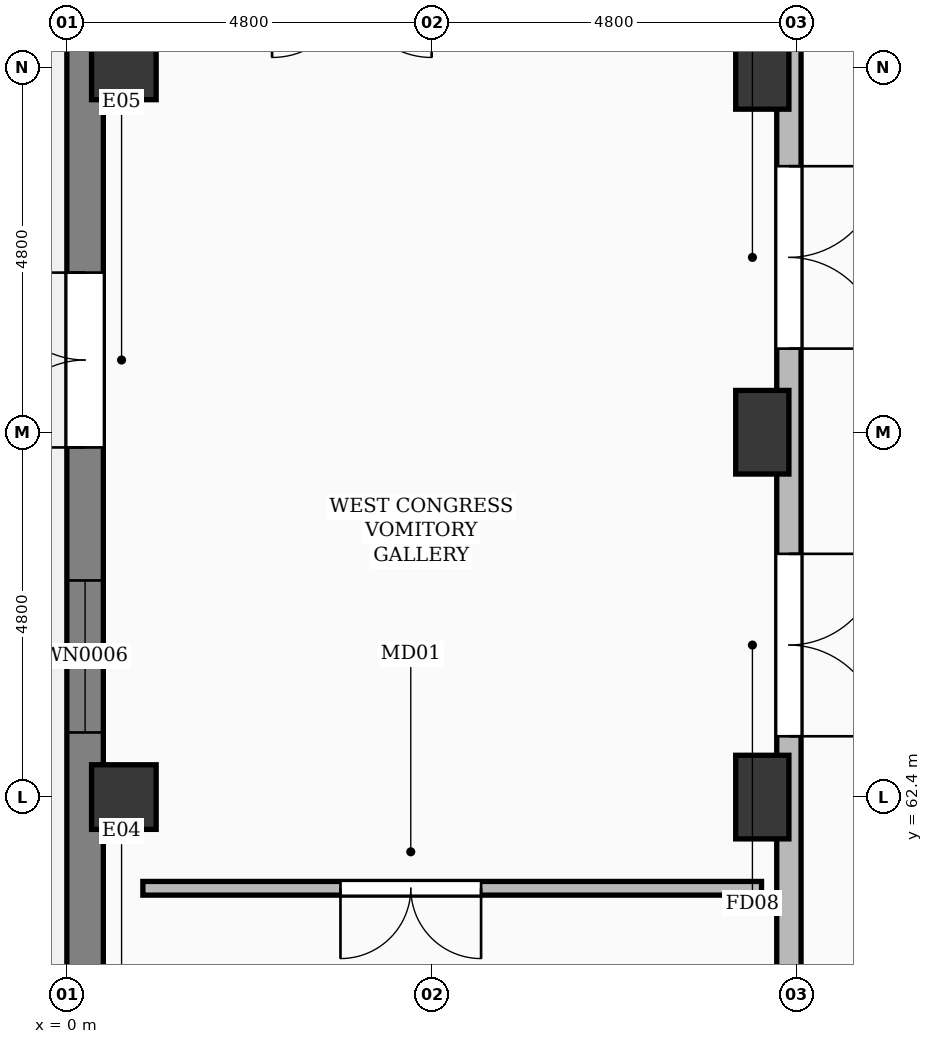
"""IFC4 building model, lengths in metres.
Left out: names, types, materials, properties, quantities, classifications, styles, units other than length and angle.
Written with IfcOpenShell. Run it as: python <this file> out.ifc"""

import sys

from ifc_helpers import new_model, si_unit, direction, frame, frame_2d, origin, origin_2d, place, context, subcontext, project, spatial, rectangle, extrude, element, fill, save


model = new_model("IFC4")
c1 = context("Model", 3, precision=1e-05, world=origin(), true_north=direction((0.0, 1.0)))
c2 = subcontext(c1, "Body", "Model", "MODEL_VIEW")
j1 = project(units=[si_unit("LENGTHUNIT", "METRE"), si_unit("PLANEANGLEUNIT", "RADIAN")], contexts=[c1])
p1 = place(None, origin())
s1 = spatial("IfcSite", under=j1, at=p1, CompositionType="ELEMENT")
p2 = place(p1, origin())
s2 = spatial("IfcBuilding", under=s1, at=p2, CompositionType="ELEMENT")
p3 = place(p2, origin())
s3 = spatial("IfcBuildingStorey", under=s2, at=p3, CompositionType="ELEMENT", Elevation=0.0)
for number, where, z_axis, x_axis in (
    (1, (0.75, 62.4, 0.0), (0.0, 0.0, 1.0), (1.0, 0.0, 0.0)),
    (2, (0.75, 72.0, 0.0), (0.0, 0.0, 1.0), (1.0, 0.0, 0.0)),
):
    element("IfcColumn", number, at=place(p3, frame(where, z_axis=z_axis, x_axis=x_axis)), inside=s3, PredefinedType="COLUMN", context=c2, shape_type="SweptSolid", body=[
        extrude(rectangle(XDim=0.85, YDim=0.85, at=origin_2d()), origin(), (0.0, 0.0, 1.0), 6.0),
    ])
for number, where, z_axis, x_axis in (
    (3, (9.15, 62.4, 0.0), (0.0, 0.0, 1.0), (1.0, 0.0, 0.0)),
    (4, (9.15, 67.2, 0.0), (0.0, 0.0, 1.0), (1.0, 0.0, 0.0)),
    (5, (9.15, 72.0, 0.0), (0.0, 0.0, 1.0), (1.0, 0.0, 0.0)),
):
    element("IfcColumn", number, at=place(p3, frame(where, z_axis=z_axis, x_axis=x_axis)), inside=s3, PredefinedType="COLUMN", context=c2, shape_type="SweptSolid", body=[
        extrude(rectangle(XDim=0.7, YDim=1.1, at=origin_2d()), origin(), (0.0, 0.0, 1.0), 6.0),
    ])
p4 = place(p3, frame((0.24, 33.6, 0.0), z_axis=(0.0, 0.0, 1.0), x_axis=(0.0, 1.0, 0.0)))
e6 = element("IfcWall", 6, at=p4, inside=s3, PredefinedType="SOLIDWALL", context=c2, shape_type="SweptSolid", body=[
    extrude(rectangle(XDim=92.4, YDim=0.48, at=frame_2d((46.2, 0.0))), origin(), (0.0, 0.0, 1.0), 6.0),
])
p5 = place(p4, frame((4.2, 0.0, 0.0)))
e7 = element("IfcOpeningElement", 7, at=p5, cuts=e6, PredefinedType="OPENING", context=c2, shape_type="SweptSolid", body=[
    extrude(rectangle(XDim=2.3, YDim=2.4, at=frame_2d((1.15, 1.2))), frame((0.0, 0.252, 0.0), z_axis=(0.0, -1.0, 0.0), x_axis=(1.0, 0.0, 0.0)), (0.0, 0.0, 1.0), 0.504),
])
p6 = place(p4, frame((10.35, 0.0, 0.0)))
e8 = element("IfcOpeningElement", 8, at=p6, cuts=e6, PredefinedType="OPENING", context=c2, shape_type="SweptSolid", body=[
    extrude(rectangle(XDim=2.3, YDim=2.4, at=frame_2d((1.15, 1.2))), frame((0.0, 0.252, 0.0), z_axis=(0.0, -1.0, 0.0), x_axis=(1.0, 0.0, 0.0)), (0.0, 0.0, 1.0), 0.504),
])
p7 = place(p4, frame((19.9, 0.0, 0.0)))
e9 = element("IfcOpeningElement", 9, at=p7, cuts=e6, PredefinedType="OPENING", context=c2, shape_type="SweptSolid", body=[
    extrude(rectangle(XDim=2.3, YDim=2.4, at=frame_2d((1.15, 1.2))), frame((0.0, 0.252, 0.0), z_axis=(0.0, -1.0, 0.0), x_axis=(1.0, 0.0, 0.0)), (0.0, 0.0, 1.0), 0.504),
])
p8 = place(p4, frame((23.8, 0.0, 0.0)))
e10 = element("IfcOpeningElement", 10, at=p8, cuts=e6, PredefinedType="OPENING", context=c2, shape_type="SweptSolid", body=[
    extrude(rectangle(XDim=2.3, YDim=2.4, at=frame_2d((1.15, 1.2))), frame((0.0, 0.252, 0.0), z_axis=(0.0, -1.0, 0.0), x_axis=(1.0, 0.0, 0.0)), (0.0, 0.0, 1.0), 0.504),
])
p9 = place(p4, frame((33.4, 0.0, 0.0)))
e11 = element("IfcOpeningElement", 11, at=p9, cuts=e6, PredefinedType="OPENING", context=c2, shape_type="SweptSolid", body=[
    extrude(rectangle(XDim=2.3, YDim=2.4, at=frame_2d((1.15, 1.2))), frame((0.0, 0.252, 0.0), z_axis=(0.0, -1.0, 0.0), x_axis=(1.0, 0.0, 0.0)), (0.0, 0.0, 1.0), 0.504),
])
p10 = place(p4, frame((42.6, 0.0, 0.0)))
e12 = element("IfcOpeningElement", 12, at=p10, cuts=e6, PredefinedType="OPENING", context=c2, shape_type="SweptSolid", body=[
    extrude(rectangle(XDim=2.3, YDim=2.4, at=frame_2d((1.15, 1.2))), frame((0.0, 0.252, 0.0), z_axis=(0.0, -1.0, 0.0), x_axis=(1.0, 0.0, 0.0)), (0.0, 0.0, 1.0), 0.504),
])
p11 = place(p4, frame((48.8, 0.0, 0.0)))
e13 = element("IfcOpeningElement", 13, at=p11, cuts=e6, PredefinedType="OPENING", context=c2, shape_type="SweptSolid", body=[
    extrude(rectangle(XDim=2.3, YDim=2.4, at=frame_2d((1.15, 1.2))), frame((0.0, 0.252, 0.0), z_axis=(0.0, -1.0, 0.0), x_axis=(1.0, 0.0, 0.0)), (0.0, 0.0, 1.0), 0.504),
])
p12 = place(p4, frame((57.0, 0.0, 0.0)))
e14 = element("IfcOpeningElement", 14, at=p12, cuts=e6, PredefinedType="OPENING", context=c2, shape_type="SweptSolid", body=[
    extrude(rectangle(XDim=2.3, YDim=2.4, at=frame_2d((1.15, 1.2))), frame((0.0, 0.252, 0.0), z_axis=(0.0, -1.0, 0.0), x_axis=(1.0, 0.0, 0.0)), (0.0, 0.0, 1.0), 0.504),
])
p13 = place(p4, frame((66.6, 0.0, 0.0)))
e15 = element("IfcOpeningElement", 15, at=p13, cuts=e6, PredefinedType="OPENING", context=c2, shape_type="SweptSolid", body=[
    extrude(rectangle(XDim=2.3, YDim=2.4, at=frame_2d((1.15, 1.2))), frame((0.0, 0.252, 0.0), z_axis=(0.0, -1.0, 0.0), x_axis=(1.0, 0.0, 0.0)), (0.0, 0.0, 1.0), 0.504),
])
p14 = place(p4, frame((76.2, 0.0, 0.0)))
e16 = element("IfcOpeningElement", 16, at=p14, cuts=e6, PredefinedType="OPENING", context=c2, shape_type="SweptSolid", body=[
    extrude(rectangle(XDim=2.3, YDim=2.4, at=frame_2d((1.15, 1.2))), frame((0.0, 0.252, 0.0), z_axis=(0.0, -1.0, 0.0), x_axis=(1.0, 0.0, 0.0)), (0.0, 0.0, 1.0), 0.504),
])
p15 = place(p4, frame((85.8, 0.0, 0.0)))
e17 = element("IfcOpeningElement", 17, at=p15, cuts=e6, PredefinedType="OPENING", context=c2, shape_type="SweptSolid", body=[
    extrude(rectangle(XDim=2.3, YDim=2.4, at=frame_2d((1.15, 1.2))), frame((0.0, 0.252, 0.0), z_axis=(0.0, -1.0, 0.0), x_axis=(1.0, 0.0, 0.0)), (0.0, 0.0, 1.0), 0.504),
])
p16 = place(p4, frame((14.4, 0.0, 1.1)))
e18 = element("IfcOpeningElement", 18, at=p16, cuts=e6, PredefinedType="OPENING", context=c2, shape_type="SweptSolid", body=[
    extrude(rectangle(XDim=1.6, YDim=2.8, at=frame_2d((0.8, 1.4))), frame((0.0, 0.252, 0.0), z_axis=(0.0, -1.0, 0.0), x_axis=(1.0, 0.0, 0.0)), (0.0, 0.0, 1.0), 0.504),
])
p17 = place(p4, frame((29.65, 0.0, 1.1)))
e19 = element("IfcOpeningElement", 19, at=p17, cuts=e6, PredefinedType="OPENING", context=c2, shape_type="SweptSolid", body=[
    extrude(rectangle(XDim=2.0, YDim=2.8, at=frame_2d((1.0, 1.4))), frame((0.0, 0.252, 0.0), z_axis=(0.0, -1.0, 0.0), x_axis=(1.0, 0.0, 0.0)), (0.0, 0.0, 1.0), 0.504),
])
p18 = place(p4, frame((39.25, 0.0, 1.1)))
e20 = element("IfcOpeningElement", 20, at=p18, cuts=e6, PredefinedType="OPENING", context=c2, shape_type="SweptSolid", body=[
    extrude(rectangle(XDim=2.4, YDim=3.0, at=frame_2d((1.2, 1.5))), frame((0.0, 0.252, 0.0), z_axis=(0.0, -1.0, 0.0), x_axis=(1.0, 0.0, 0.0)), (0.0, 0.0, 1.0), 0.504),
])
p19 = place(p3, frame((9.5, 34.2, 0.0), z_axis=(0.0, 0.0, 1.0), x_axis=(0.0, 1.0, 0.0)))
e21 = element("IfcWall", 21, at=p19, inside=s3, PredefinedType="SOLIDWALL", context=c2, shape_type="SweptSolid", body=[
    extrude(rectangle(XDim=51.6, YDim=0.32, at=frame_2d((25.8, 0.0))), origin(), (0.0, 0.0, 1.0), 4.292),
])
p20 = place(p19, frame((29.0, 0.0, 0.0)))
e22 = element("IfcOpeningElement", 22, at=p20, cuts=e21, PredefinedType="OPENING", context=c2, shape_type="SweptSolid", body=[
    extrude(rectangle(XDim=2.4, YDim=2.5, at=frame_2d((1.2, 1.25))), frame((0.0, 0.172, 0.0), z_axis=(0.0, -1.0, 0.0), x_axis=(1.0, 0.0, 0.0)), (0.0, 0.0, 1.0), 0.344),
])
p21 = place(p19, frame((34.1, 0.0, 0.0)))
e23 = element("IfcOpeningElement", 23, at=p21, cuts=e21, PredefinedType="OPENING", context=c2, shape_type="SweptSolid", body=[
    extrude(rectangle(XDim=2.4, YDim=2.5, at=frame_2d((1.2, 1.25))), frame((0.0, 0.172, 0.0), z_axis=(0.0, -1.0, 0.0), x_axis=(1.0, 0.0, 0.0)), (0.0, 0.0, 1.0), 0.344),
])
p22 = place(p3, frame((1.0, 61.2, 0.0), z_axis=(0.0, 0.0, 1.0), x_axis=(1.0, 0.0, 0.0)))
e24 = element("IfcWall", 24, at=p22, inside=s3, PredefinedType="PARTITIONING", context=c2, shape_type="SweptSolid", body=[
    extrude(rectangle(XDim=8.14, YDim=0.18, at=frame_2d((4.07, 0.0))), origin(), (0.0, 0.0, 1.0), 4.292),
])
p23 = place(p22, frame((2.6, 0.0, 0.0)))
e25 = element("IfcOpeningElement", 25, at=p23, cuts=e24, PredefinedType="OPENING", context=c2, shape_type="SweptSolid", body=[
    extrude(rectangle(XDim=1.85, YDim=2.35, at=frame_2d((0.925, 1.175))), frame((0.0, 0.102, 0.0), z_axis=(0.0, -1.0, 0.0), x_axis=(1.0, 0.0, 0.0)), (0.0, 0.0, 1.0), 0.204),
])
p24 = place(p9, origin())
e26 = element("IfcDoor", 26, at=p24, inside=s3, OperationType="DOUBLE_DOOR_SINGLE_SWING", PredefinedType="DOOR", context=c2, shape_type="SweptSolid", body=[
    extrude(rectangle(XDim=2.3, YDim=2.4, at=frame_2d((1.15, 1.2))), frame((0.0, 0.025, 0.0), z_axis=(0.0, -1.0, 0.0), x_axis=(1.0, 0.0, 0.0)), (0.0, 0.0, 1.0), 0.05),
])
fill(e11, e26)
p25 = place(p17, origin())
e27 = element("IfcWindow", 27, at=p25, inside=s3, PartitioningType="SINGLE_PANEL", PredefinedType="WINDOW", context=c2, shape_type="SweptSolid", body=[
    extrude(rectangle(XDim=2.0, YDim=2.8, at=frame_2d((1.0, 1.4))), frame((0.0, 0.03, 0.0), z_axis=(0.0, -1.0, 0.0), x_axis=(1.0, 0.0, 0.0)), (0.0, 0.0, 1.0), 0.06),
])
fill(e19, e27)
p26 = place(p20, frame((2.4, 0.0, 0.0), z_axis=(0.0, 0.0, 1.0), x_axis=(-1.0, 0.0, 0.0)))
e28 = element("IfcDoor", 28, at=p26, inside=s3, OperationType="DOUBLE_DOOR_SINGLE_SWING", PredefinedType="DOOR", context=c2, shape_type="SweptSolid", body=[
    extrude(rectangle(XDim=2.4, YDim=2.5, at=frame_2d((1.2, 1.25))), frame((0.0, 0.025, 0.0), z_axis=(0.0, -1.0, 0.0), x_axis=(1.0, 0.0, 0.0)), (0.0, 0.0, 1.0), 0.05),
])
fill(e22, e28)
p27 = place(p21, frame((2.4, 0.0, 0.0), z_axis=(0.0, 0.0, 1.0), x_axis=(-1.0, 0.0, 0.0)))
e29 = element("IfcDoor", 29, at=p27, inside=s3, OperationType="DOUBLE_DOOR_SINGLE_SWING", PredefinedType="DOOR", context=c2, shape_type="SweptSolid", body=[
    extrude(rectangle(XDim=2.4, YDim=2.5, at=frame_2d((1.2, 1.25))), frame((0.0, 0.025, 0.0), z_axis=(0.0, -1.0, 0.0), x_axis=(1.0, 0.0, 0.0)), (0.0, 0.0, 1.0), 0.05),
])
fill(e23, e29)
p28 = place(p23, frame((1.85, 0.0, 0.0), z_axis=(0.0, 0.0, 1.0), x_axis=(-1.0, 0.0, 0.0)))
e30 = element("IfcDoor", 30, at=p28, inside=s3, OperationType="DOUBLE_DOOR_SINGLE_SWING", PredefinedType="DOOR", context=c2, shape_type="SweptSolid", body=[
    extrude(rectangle(XDim=1.85, YDim=2.35, at=frame_2d((0.925, 1.175))), frame((0.0, 0.025, 0.0), z_axis=(0.0, -1.0, 0.0), x_axis=(1.0, 0.0, 0.0)), (0.0, 0.0, 1.0), 0.05),
])
fill(e25, e30)
save(model, sys.argv[1])
